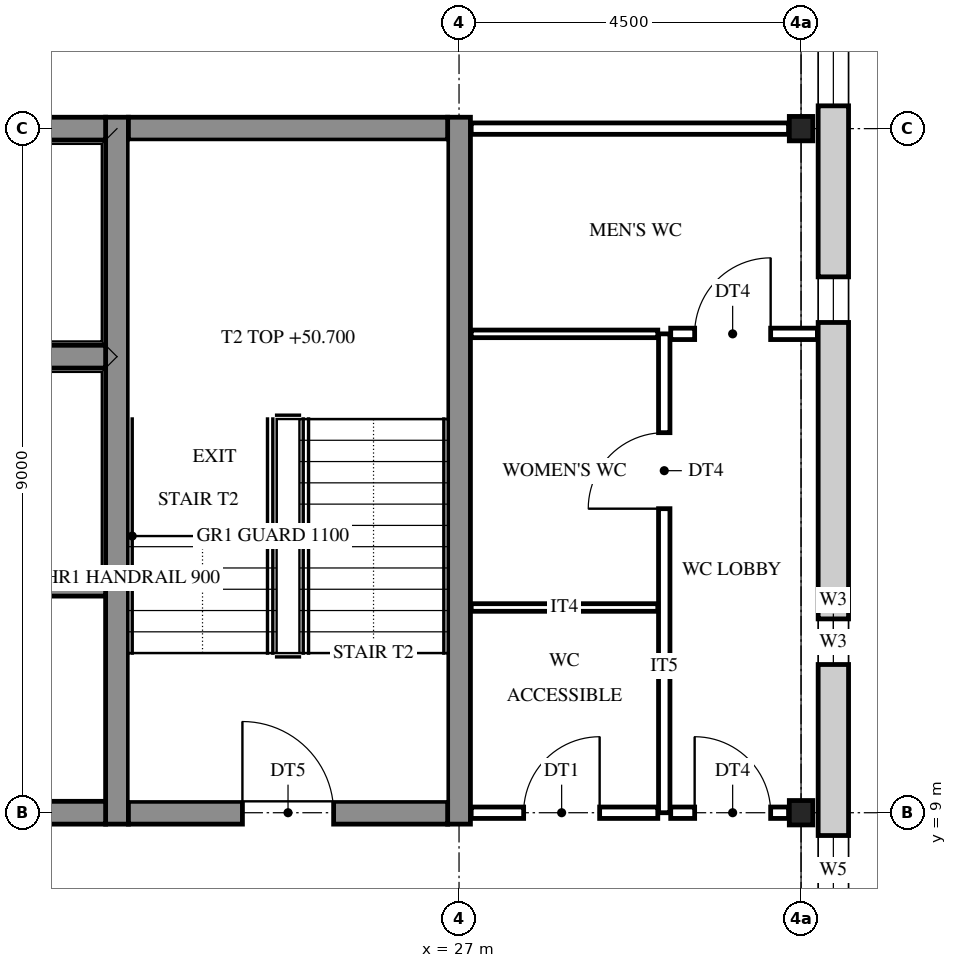
"""IFC4 building model, lengths in metres.
Left out: names, types, materials, properties, quantities, classifications, styles, units other than length and angle.
Written with IfcOpenShell. Run it as: python <this file> out.ifc"""

import sys

from ifc_helpers import new_model, si_unit, direction, frame, frame_2d, origin, origin_2d, place, context, subcontext, project, spatial, rectangle, i_section, extrude, element, fill, save


model = new_model("IFC4")
c1 = context("Model", 3, precision=1e-05, world=origin(), true_north=direction((0.0, 1.0)))
c2 = subcontext(c1, "Body", "Model", "MODEL_VIEW")
j1 = project(units=[si_unit("LENGTHUNIT", "METRE"), si_unit("PLANEANGLEUNIT", "RADIAN")], contexts=[c1])
p1 = place(None, origin())
s1 = spatial("IfcSite", under=j1, at=p1, CompositionType="ELEMENT")
p2 = place(p1, origin())
s2 = spatial("IfcBuilding", under=s1, at=p2, CompositionType="ELEMENT")
p3 = place(p2, frame((0.0, 0.0, 48.6)))
s3 = spatial("IfcBuildingStorey", under=s2, at=p3, CompositionType="ELEMENT", Elevation=48.6)
for number, where, z_axis, x_axis in (
    (1, (31.5, 9.0, 0.0), (0.0, 0.0, 1.0), (1.0, 0.0, 0.0)),
    (2, (31.5, 18.0, 0.0), (0.0, 0.0, 1.0), (1.0, 0.0, 0.0)),
):
    element("IfcColumn", number, at=place(p3, frame(where, z_axis=z_axis, x_axis=x_axis)), inside=s3, PredefinedType="COLUMN", context=c2, shape_type="SweptSolid", body=[
        extrude(i_section(OverallWidth=0.309, OverallDepth=0.321, WebThickness=0.014, FlangeThickness=0.022, FilletRadius=0.017, at=origin_2d()), origin(), (0.0, 0.0, 1.0), 4.2),
    ])
for number, where, z_axis, x_axis in (
    (3, (22.5, 8.85, 0.0), (0.0, 0.0, 1.0), (0.0, 1.0, 0.0)),
    (4, (27.0, 8.85, 0.0), (0.0, 0.0, 1.0), (0.0, 1.0, 0.0)),
):
    element("IfcWall", number, at=place(p3, frame(where, z_axis=z_axis, x_axis=x_axis)), inside=s3, PredefinedType="SHEAR", context=c2, shape_type="SweptSolid", body=[
        extrude(rectangle(XDim=9.3, YDim=0.3, at=frame_2d((4.65, 0.0))), origin(), (0.0, 0.0, 1.0), 4.2),
    ])
p4 = place(p3, frame((19.65, 9.0, 0.0), z_axis=(0.0, 0.0, 1.0), x_axis=(1.0, 0.0, 0.0)))
e5 = element("IfcWall", 5, at=p4, inside=s3, PredefinedType="SHEAR", context=c2, shape_type="SweptSolid", body=[
    extrude(rectangle(XDim=2.7, YDim=0.3, at=frame_2d((1.35, 0.0))), origin(), (0.0, 0.0, 1.0), 4.2),
])
p5 = place(p3, frame((22.65, 9.0, 0.0), z_axis=(0.0, 0.0, 1.0), x_axis=(1.0, 0.0, 0.0)))
e6 = element("IfcWall", 6, at=p5, inside=s3, PredefinedType="SHEAR", context=c2, shape_type="SweptSolid", body=[
    extrude(rectangle(XDim=4.2, YDim=0.3, at=frame_2d((2.1, 0.0))), origin(), (0.0, 0.0, 1.0), 4.2),
])
p6 = place(p5, frame((1.5, 0.0, 0.0)))
e7 = element("IfcOpeningElement", 7, at=p6, cuts=e6, PredefinedType="OPENING", context=c2, shape_type="SweptSolid", body=[
    extrude(rectangle(XDim=1.2, YDim=2.1, at=frame_2d((0.6, 1.05))), frame((0.0, 0.16, 0.0), z_axis=(0.0, -1.0, 0.0), x_axis=(1.0, 0.0, 0.0)), (0.0, 0.0, 1.0), 0.32),
])
for number, where, z_axis, x_axis in (
    (8, (19.65, 12.0, 0.0), (0.0, 0.0, 1.0), (1.0, 0.0, 0.0)),
    (9, (19.65, 15.0, 0.0), (0.0, 0.0, 1.0), (1.0, 0.0, 0.0)),
    (10, (19.65, 18.0, 0.0), (0.0, 0.0, 1.0), (1.0, 0.0, 0.0)),
):
    element("IfcWall", number, at=place(p3, frame(where, z_axis=z_axis, x_axis=x_axis)), inside=s3, PredefinedType="SHEAR", context=c2, shape_type="SweptSolid", body=[
        extrude(rectangle(XDim=2.7, YDim=0.3, at=frame_2d((1.35, 0.0))), origin(), (0.0, 0.0, 1.0), 4.2),
    ])
p7 = place(p3, frame((22.65, 18.0, 0.0), z_axis=(0.0, 0.0, 1.0), x_axis=(1.0, 0.0, 0.0)))
e11 = element("IfcWall", 11, at=p7, inside=s3, PredefinedType="SHEAR", context=c2, shape_type="SweptSolid", body=[
    extrude(rectangle(XDim=4.2, YDim=0.3, at=frame_2d((2.1, 0.0))), origin(), (0.0, 0.0, 1.0), 4.2),
])
p8 = place(p3, frame((31.925, 27.225, 0.0), z_axis=(0.0, 0.0, 1.0), x_axis=(0.0, -1.0, 0.0)))
e12 = element("IfcWall", 12, at=p8, inside=s3, PredefinedType="STANDARD", context=c2, shape_type="SweptSolid", body=[
    extrude(rectangle(XDim=27.45, YDim=0.4, at=frame_2d((13.725, 0.0))), origin(), (0.0, 0.0, 1.0), 4.2),
])
p9 = place(p8, frame((26.025, 0.0, 0.9)))
e13 = element("IfcOpeningElement", 13, at=p9, cuts=e12, PredefinedType="OPENING", context=c2, shape_type="SweptSolid", body=[
    extrude(rectangle(XDim=0.9, YDim=2.0, at=frame_2d((0.45, 1.0))), frame((0.0, 0.21, 0.0), z_axis=(0.0, -1.0, 0.0), x_axis=(1.0, 0.0, 0.0)), (0.0, 0.0, 1.0), 0.42),
])
p10 = place(p8, frame((18.525, 0.0, 0.9)))
e14 = element("IfcOpeningElement", 14, at=p10, cuts=e12, PredefinedType="OPENING", context=c2, shape_type="SweptSolid", body=[
    extrude(rectangle(XDim=0.9, YDim=2.0, at=frame_2d((0.45, 1.0))), frame((0.0, 0.21, 0.0), z_axis=(0.0, -1.0, 0.0), x_axis=(1.0, 0.0, 0.0)), (0.0, 0.0, 1.0), 0.42),
])
p11 = place(p8, frame((15.675, 0.0, 1.6)))
e15 = element("IfcOpeningElement", 15, at=p11, cuts=e12, PredefinedType="OPENING", context=c2, shape_type="SweptSolid", body=[
    extrude(rectangle(XDim=0.6, YDim=0.9, at=frame_2d((0.3, 0.45))), frame((0.0, 0.21, 0.0), z_axis=(0.0, -1.0, 0.0), x_axis=(1.0, 0.0, 0.0)), (0.0, 0.0, 1.0), 0.42),
])
p12 = place(p8, frame((11.175, 0.0, 1.6)))
e16 = element("IfcOpeningElement", 16, at=p12, cuts=e12, PredefinedType="OPENING", context=c2, shape_type="SweptSolid", body=[
    extrude(rectangle(XDim=0.6, YDim=0.9, at=frame_2d((0.3, 0.45))), frame((0.0, 0.21, 0.0), z_axis=(0.0, -1.0, 0.0), x_axis=(1.0, 0.0, 0.0)), (0.0, 0.0, 1.0), 0.42),
])
p13 = place(p8, frame((8.025, 0.0, 0.9)))
e17 = element("IfcOpeningElement", 17, at=p13, cuts=e12, PredefinedType="OPENING", context=c2, shape_type="SweptSolid", body=[
    extrude(rectangle(XDim=0.9, YDim=2.0, at=frame_2d((0.45, 1.0))), frame((0.0, 0.21, 0.0), z_axis=(0.0, -1.0, 0.0), x_axis=(1.0, 0.0, 0.0)), (0.0, 0.0, 1.0), 0.42),
])
p14 = place(p8, frame((0.525, 0.0, 0.9)))
e18 = element("IfcOpeningElement", 18, at=p14, cuts=e12, PredefinedType="OPENING", context=c2, shape_type="SweptSolid", body=[
    extrude(rectangle(XDim=0.9, YDim=2.0, at=frame_2d((0.45, 1.0))), frame((0.0, 0.21, 0.0), z_axis=(0.0, -1.0, 0.0), x_axis=(1.0, 0.0, 0.0)), (0.0, 0.0, 1.0), 0.42),
])
p15 = place(p3, frame((29.7, 9.0, 0.0), z_axis=(0.0, 0.0, 1.0), x_axis=(0.0, 1.0, 0.0)))
e19 = element("IfcWall", 19, at=p15, inside=s3, PredefinedType="PARTITIONING", context=c2, shape_type="SweptSolid", body=[
    extrude(rectangle(XDim=6.3, YDim=0.15, at=frame_2d((3.15, 0.0))), origin(), (0.0, 0.0, 1.0), 3.542),
])
p16 = place(p15, frame((4.0, 0.0, 0.0)))
e20 = element("IfcOpeningElement", 20, at=p16, cuts=e19, PredefinedType="OPENING", context=c2, shape_type="SweptSolid", body=[
    extrude(rectangle(XDim=1.0, YDim=2.1, at=frame_2d((0.5, 1.05))), frame((0.0, 0.085, 0.0), z_axis=(0.0, -1.0, 0.0), x_axis=(1.0, 0.0, 0.0)), (0.0, 0.0, 1.0), 0.17),
])
p17 = place(p3, frame((27.16, 9.0, 0.0), z_axis=(0.0, 0.0, 1.0), x_axis=(1.0, 0.0, 0.0)))
e21 = element("IfcWall", 21, at=p17, inside=s3, PredefinedType="PARTITIONING", context=c2, shape_type="SweptSolid", body=[
    extrude(rectangle(XDim=2.455, YDim=0.15, at=frame_2d((1.228, 0.0))), origin(), (0.0, 0.0, 1.0), 3.542),
])
p18 = place(p17, frame((0.69, 0.0, 0.0)))
e22 = element("IfcOpeningElement", 22, at=p18, cuts=e21, PredefinedType="OPENING", context=c2, shape_type="SweptSolid", body=[
    extrude(rectangle(XDim=1.0, YDim=2.1, at=frame_2d((0.5, 1.05))), frame((0.0, 0.085, 0.0), z_axis=(0.0, -1.0, 0.0), x_axis=(1.0, 0.0, 0.0)), (0.0, 0.0, 1.0), 0.17),
])
p19 = place(p3, frame((29.785, 9.0, 0.0), z_axis=(0.0, 0.0, 1.0), x_axis=(1.0, 0.0, 0.0)))
e23 = element("IfcWall", 23, at=p19, inside=s3, PredefinedType="PARTITIONING", context=c2, shape_type="SweptSolid", body=[
    extrude(rectangle(XDim=1.551, YDim=0.15, at=frame_2d((0.775, 0.0))), origin(), (0.0, 0.0, 1.0), 3.542),
])
p20 = place(p19, frame((0.315, 0.0, 0.0)))
e24 = element("IfcOpeningElement", 24, at=p20, cuts=e23, PredefinedType="OPENING", context=c2, shape_type="SweptSolid", body=[
    extrude(rectangle(XDim=1.0, YDim=2.1, at=frame_2d((0.5, 1.05))), frame((0.0, 0.085, 0.0), z_axis=(0.0, -1.0, 0.0), x_axis=(1.0, 0.0, 0.0)), (0.0, 0.0, 1.0), 0.17),
])
for number, where, z_axis, x_axis in (
    (25, (27.16, 11.7, 0.0), (0.0, 0.0, 1.0), (1.0, 0.0, 0.0)),
    (26, (27.16, 15.3, 0.0), (0.0, 0.0, 1.0), (1.0, 0.0, 0.0)),
):
    element("IfcWall", number, at=place(p3, frame(where, z_axis=z_axis, x_axis=x_axis)), inside=s3, PredefinedType="PARTITIONING", context=c2, shape_type="SweptSolid", body=[
        extrude(rectangle(XDim=2.455, YDim=0.1, at=frame_2d((1.228, 0.0))), origin(), (0.0, 0.0, 1.0), 3.542),
    ])
p21 = place(p3, frame((29.785, 15.3, 0.0), z_axis=(0.0, 0.0, 1.0), x_axis=(1.0, 0.0, 0.0)))
e27 = element("IfcWall", 27, at=p21, inside=s3, PredefinedType="PARTITIONING", context=c2, shape_type="SweptSolid", body=[
    extrude(rectangle(XDim=1.93, YDim=0.15, at=frame_2d((0.965, 0.0))), origin(), (0.0, 0.0, 1.0), 3.542),
])
p22 = place(p21, frame((0.315, 0.0, 0.0)))
e28 = element("IfcOpeningElement", 28, at=p22, cuts=e27, PredefinedType="OPENING", context=c2, shape_type="SweptSolid", body=[
    extrude(rectangle(XDim=1.0, YDim=2.1, at=frame_2d((0.5, 1.05))), frame((0.0, 0.085, 0.0), z_axis=(0.0, -1.0, 0.0), x_axis=(1.0, 0.0, 0.0)), (0.0, 0.0, 1.0), 0.17),
])
p23 = place(p3, frame((27.16, 18.0, 0.0), z_axis=(0.0, 0.0, 1.0), x_axis=(1.0, 0.0, 0.0)))
e29 = element("IfcWall", 29, at=p23, inside=s3, PredefinedType="PARTITIONING", context=c2, shape_type="SweptSolid", body=[
    extrude(rectangle(XDim=4.176, YDim=0.15, at=frame_2d((2.088, 0.0))), origin(), (0.0, 0.0, 1.0), 3.542),
])
p24 = place(p10, origin())
e30 = element("IfcWindow", 30, at=p24, inside=s3, PartitioningType="SINGLE_PANEL", PredefinedType="WINDOW", context=c2, shape_type="SweptSolid", body=[
    extrude(rectangle(XDim=0.9, YDim=2.0, at=frame_2d((0.45, 1.0))), frame((0.0, 0.03, 0.0), z_axis=(0.0, -1.0, 0.0), x_axis=(1.0, 0.0, 0.0)), (0.0, 0.0, 1.0), 0.06),
])
fill(e14, e30)
p25 = place(p11, origin())
e31 = element("IfcWindow", 31, at=p25, inside=s3, PartitioningType="SINGLE_PANEL", PredefinedType="WINDOW", context=c2, shape_type="SweptSolid", body=[
    extrude(rectangle(XDim=0.6, YDim=0.9, at=frame_2d((0.3, 0.45))), frame((0.0, 0.03, 0.0), z_axis=(0.0, -1.0, 0.0), x_axis=(1.0, 0.0, 0.0)), (0.0, 0.0, 1.0), 0.06),
])
fill(e15, e31)
p26 = place(p12, origin())
e32 = element("IfcWindow", 32, at=p26, inside=s3, PartitioningType="SINGLE_PANEL", PredefinedType="WINDOW", context=c2, shape_type="SweptSolid", body=[
    extrude(rectangle(XDim=0.6, YDim=0.9, at=frame_2d((0.3, 0.45))), frame((0.0, 0.03, 0.0), z_axis=(0.0, -1.0, 0.0), x_axis=(1.0, 0.0, 0.0)), (0.0, 0.0, 1.0), 0.06),
])
fill(e16, e32)
p27 = place(p13, origin())
e33 = element("IfcWindow", 33, at=p27, inside=s3, PartitioningType="SINGLE_PANEL", PredefinedType="WINDOW", context=c2, shape_type="SweptSolid", body=[
    extrude(rectangle(XDim=0.9, YDim=2.0, at=frame_2d((0.45, 1.0))), frame((0.0, 0.03, 0.0), z_axis=(0.0, -1.0, 0.0), x_axis=(1.0, 0.0, 0.0)), (0.0, 0.0, 1.0), 0.06),
])
fill(e17, e33)
p28 = place(p6, origin())
e34 = element("IfcDoor", 34, at=p28, inside=s3, OperationType="SINGLE_SWING_LEFT", PredefinedType="DOOR", context=c2, shape_type="SweptSolid", body=[
    extrude(rectangle(XDim=1.2, YDim=2.1, at=frame_2d((0.6, 1.05))), frame((0.0, 0.025, 0.0), z_axis=(0.0, -1.0, 0.0), x_axis=(1.0, 0.0, 0.0)), (0.0, 0.0, 1.0), 0.05),
])
fill(e7, e34)
p29 = place(p18, origin())
e35 = element("IfcDoor", 35, at=p29, inside=s3, OperationType="SINGLE_SWING_RIGHT", PredefinedType="DOOR", context=c2, shape_type="SweptSolid", body=[
    extrude(rectangle(XDim=1.0, YDim=2.1, at=frame_2d((0.5, 1.05))), frame((0.0, 0.025, 0.0), z_axis=(0.0, -1.0, 0.0), x_axis=(1.0, 0.0, 0.0)), (0.0, 0.0, 1.0), 0.05),
])
fill(e22, e35)
p30 = place(p16, origin())
e36 = element("IfcDoor", 36, at=p30, inside=s3, OperationType="SINGLE_SWING_LEFT", PredefinedType="DOOR", context=c2, shape_type="SweptSolid", body=[
    extrude(rectangle(XDim=1.0, YDim=2.1, at=frame_2d((0.5, 1.05))), frame((0.0, 0.025, 0.0), z_axis=(0.0, -1.0, 0.0), x_axis=(1.0, 0.0, 0.0)), (0.0, 0.0, 1.0), 0.05),
])
fill(e20, e36)
p31 = place(p22, origin())
e37 = element("IfcDoor", 37, at=p31, inside=s3, OperationType="SINGLE_SWING_RIGHT", PredefinedType="DOOR", context=c2, shape_type="SweptSolid", body=[
    extrude(rectangle(XDim=1.0, YDim=2.1, at=frame_2d((0.5, 1.05))), frame((0.0, 0.025, 0.0), z_axis=(0.0, -1.0, 0.0), x_axis=(1.0, 0.0, 0.0)), (0.0, 0.0, 1.0), 0.05),
])
fill(e28, e37)
p32 = place(p20, origin())
e38 = element("IfcDoor", 38, at=p32, inside=s3, OperationType="SINGLE_SWING_LEFT", PredefinedType="DOOR", context=c2, shape_type="SweptSolid", body=[
    extrude(rectangle(XDim=1.0, YDim=2.1, at=frame_2d((0.5, 1.05))), frame((0.0, 0.025, 0.0), z_axis=(0.0, -1.0, 0.0), x_axis=(1.0, 0.0, 0.0)), (0.0, 0.0, 1.0), 0.05),
])
fill(e24, e38)
save(model, sys.argv[1])
